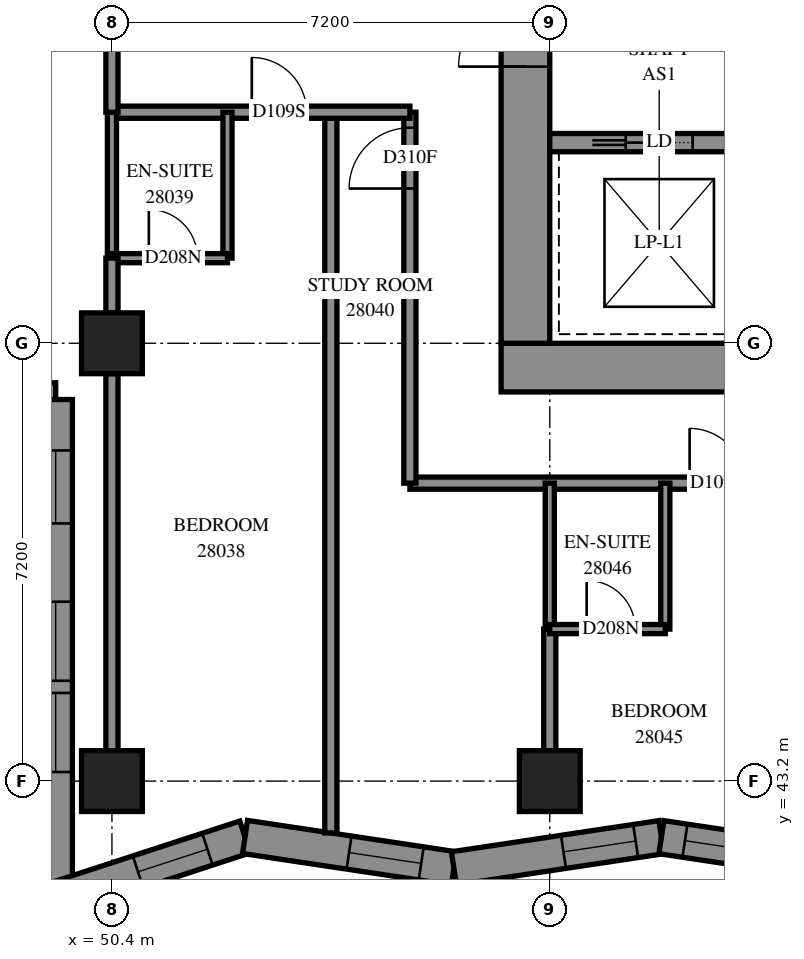
"""IFC4 building model, lengths in metres.
Left out: names, types, materials, properties, quantities, classifications, styles, units other than length and angle.
Written with IfcOpenShell. Run it as: python <this file> out.ifc"""

import sys

from ifc_helpers import new_model, si_unit, direction, frame, frame_2d, origin, origin_2d, place, context, subcontext, project, spatial, polyline, rectangle, outline, extrude, element, fill, save


model = new_model("IFC4")
c1 = context("Model", 3, precision=1e-05, world=origin(), true_north=direction((0.0, 1.0)))
c2 = subcontext(c1, "Body", "Model", "MODEL_VIEW")
j1 = project(units=[si_unit("LENGTHUNIT", "METRE"), si_unit("PLANEANGLEUNIT", "RADIAN")], contexts=[c1])
p1 = place(None, origin())
s1 = spatial("IfcSite", under=j1, at=p1, CompositionType="ELEMENT")
p2 = place(p1, origin())
s2 = spatial("IfcBuilding", under=s1, at=p2, CompositionType="ELEMENT")
p3 = place(p2, frame((0.0, 0.0, 105.0)))
s3 = spatial("IfcBuildingStorey", under=s2, at=p3, CompositionType="ELEMENT", Elevation=105.0)
for number, where, z_axis, x_axis in (
    (1, (50.4, 43.2, 0.0), (0.0, 0.0, 1.0), (1.0, 0.0, 0.0)),
    (2, (50.4, 50.4, 0.0), (0.0, 0.0, 1.0), (1.0, 0.0, 0.0)),
    (3, (57.6, 43.2, 0.0), (0.0, 0.0, 1.0), (1.0, 0.0, 0.0)),
):
    element("IfcColumn", number, at=place(p3, frame(where, z_axis=z_axis, x_axis=x_axis)), inside=s3, PredefinedType="COLUMN", context=c2, shape_type="SweptSolid", body=[
        extrude(rectangle(XDim=1.0, YDim=1.0, at=origin_2d()), origin(), (0.0, 0.0, 1.0), 3.1),
    ])
p4 = place(p3, frame((56.8, 50.0, -0.3), z_axis=(0.0, 0.0, 1.0), x_axis=(1.0, 0.0, 0.0)))
e4 = element("IfcWall", 4, at=p4, inside=s3, PredefinedType="SHEAR", context=c2, shape_type="SweptSolid", body=[
    extrude(rectangle(XDim=16.0, YDim=0.8, at=frame_2d((8.0, 0.0))), origin(), (0.0, 0.0, 1.0), 2.7),
])
p5 = place(p3, frame((57.2, 50.4, -0.3), z_axis=(0.0, 0.0, 1.0), x_axis=(0.0, 1.0, 0.0)))
e5 = element("IfcWall", 5, at=p5, inside=s3, PredefinedType="SHEAR", context=c2, shape_type="SweptSolid", body=[
    extrude(rectangle(XDim=14.4, YDim=0.8, at=frame_2d((7.2, 0.0))), origin(), (0.0, 0.0, 1.0), 2.7),
])
p6 = place(p5, frame((4.55, 0.0, 0.3)))
e6 = element("IfcOpeningElement", 6, at=p6, cuts=e5, PredefinedType="OPENING", context=c2, shape_type="SweptSolid", body=[
    extrude(rectangle(XDim=1.1, YDim=2.1, at=frame_2d((0.55, 1.05))), frame((0.0, 0.41, 0.0), z_axis=(0.0, -1.0, 0.0), x_axis=(1.0, 0.0, 0.0)), (0.0, 0.0, 1.0), 0.82),
])
p7 = place(p5, frame((11.35, 0.0, 0.3)))
e7 = element("IfcOpeningElement", 7, at=p7, cuts=e5, PredefinedType="OPENING", context=c2, shape_type="SweptSolid", body=[
    extrude(rectangle(XDim=1.1, YDim=2.1, at=frame_2d((0.55, 1.05))), frame((0.0, 0.41, 0.0), z_axis=(0.0, -1.0, 0.0), x_axis=(1.0, 0.0, 0.0)), (0.0, 0.0, 1.0), 0.82),
])
p8 = place(p3, frame((57.6, 53.7, 0.0), z_axis=(0.0, 0.0, 1.0), x_axis=(1.0, 0.0, 0.0)))
e8 = element("IfcWall", 8, at=p8, inside=s3, PredefinedType="SOLIDWALL", context=c2, shape_type="SweptSolid", body=[
    extrude(rectangle(XDim=14.4, YDim=0.3, at=frame_2d((7.2, 0.0))), origin(), (0.0, 0.0, 1.0), 3.1),
])
p9 = place(p8, frame((1.25, 0.0, 0.0)))
e9 = element("IfcOpeningElement", 9, at=p9, cuts=e8, PredefinedType="OPENING", context=c2, shape_type="SweptSolid", body=[
    extrude(rectangle(XDim=1.1, YDim=2.1, at=frame_2d((0.55, 1.05))), frame((0.0, 0.16, 0.0), z_axis=(0.0, -1.0, 0.0), x_axis=(1.0, 0.0, 0.0)), (0.0, 0.0, 1.0), 0.32),
])
p10 = place(p8, frame((4.85, 0.0, 0.0)))
e10 = element("IfcOpeningElement", 10, at=p10, cuts=e8, PredefinedType="OPENING", context=c2, shape_type="SweptSolid", body=[
    extrude(rectangle(XDim=1.1, YDim=2.1, at=frame_2d((0.55, 1.05))), frame((0.0, 0.16, 0.0), z_axis=(0.0, -1.0, 0.0), x_axis=(1.0, 0.0, 0.0)), (0.0, 0.0, 1.0), 0.32),
])
p11 = place(p8, frame((8.45, 0.0, 0.0)))
e11 = element("IfcOpeningElement", 11, at=p11, cuts=e8, PredefinedType="OPENING", context=c2, shape_type="SweptSolid", body=[
    extrude(rectangle(XDim=1.1, YDim=2.1, at=frame_2d((0.55, 1.05))), frame((0.0, 0.16, 0.0), z_axis=(0.0, -1.0, 0.0), x_axis=(1.0, 0.0, 0.0)), (0.0, 0.0, 1.0), 0.32),
])
p12 = place(p8, frame((12.05, 0.0, 0.0)))
e12 = element("IfcOpeningElement", 12, at=p12, cuts=e8, PredefinedType="OPENING", context=c2, shape_type="SweptSolid", body=[
    extrude(rectangle(XDim=1.1, YDim=2.1, at=frame_2d((0.55, 1.05))), frame((0.0, 0.16, 0.0), z_axis=(0.0, -1.0, 0.0), x_axis=(1.0, 0.0, 0.0)), (0.0, 0.0, 1.0), 0.32),
])
p13 = place(p3, frame((42.275, 49.475, 0.0), z_axis=(0.0, 0.0, 1.0), x_axis=(1.0, 0.0, 0.0)))
e13 = element("IfcWall", 13, at=p13, inside=s3, PredefinedType="SOLIDWALL", context=c2, shape_type="SweptSolid", body=[
    extrude(outline(polyline([(-0.275, -0.275), (6.925, -0.275), (7.475, 0.275), (0.275, 0.275), (-0.275, -0.275)])), origin(), (0.0, 0.0, 1.0), 3.1),
])
p14 = place(p13, frame((1.325, 0.0, 0.5)))
e14 = element("IfcOpeningElement", 14, at=p14, cuts=e13, PredefinedType="OPENING", context=c2, shape_type="SweptSolid", body=[
    extrude(rectangle(XDim=1.3, YDim=2.45, at=frame_2d((0.65, 1.225))), frame((0.0, 0.285, 0.0), z_axis=(0.0, -1.0, 0.0), x_axis=(1.0, 0.0, 0.0)), (0.0, 0.0, 1.0), 0.57),
])
p15 = place(p13, frame((2.825, 0.0, 0.5)))
e15 = element("IfcOpeningElement", 15, at=p15, cuts=e13, PredefinedType="OPENING", context=c2, shape_type="SweptSolid", body=[
    extrude(rectangle(XDim=1.3, YDim=2.45, at=frame_2d((0.65, 1.225))), frame((0.0, 0.285, 0.0), z_axis=(0.0, -1.0, 0.0), x_axis=(1.0, 0.0, 0.0)), (0.0, 0.0, 1.0), 0.57),
])
p16 = place(p13, frame((5.162, 0.0, 0.5)))
e16 = element("IfcOpeningElement", 16, at=p16, cuts=e13, PredefinedType="OPENING", context=c2, shape_type="SweptSolid", body=[
    extrude(rectangle(XDim=1.2, YDim=2.45, at=frame_2d((0.6, 1.225))), frame((0.0, 0.285, 0.0), z_axis=(0.0, -1.0, 0.0), x_axis=(1.0, 0.0, 0.0)), (0.0, 0.0, 1.0), 0.57),
])
p17 = place(p3, frame((49.475, 49.475, 0.0), z_axis=(0.0, 0.0, 1.0), x_axis=(0.0, -1.0, 0.0)))
e17 = element("IfcWall", 17, at=p17, inside=s3, PredefinedType="SOLIDWALL", context=c2, shape_type="SweptSolid", body=[
    extrude(outline(polyline([(0.275, -0.275), (8.587, -0.275), (7.829, 0.275), (-0.275, 0.275), (0.275, -0.275)])), origin(), (0.0, 0.0, 1.0), 3.1),
])
p18 = place(p17, frame((3.325, 0.0, 0.5)))
e18 = element("IfcOpeningElement", 18, at=p18, cuts=e17, PredefinedType="OPENING", context=c2, shape_type="SweptSolid", body=[
    extrude(rectangle(XDim=1.3, YDim=2.45, at=frame_2d((0.65, 1.225))), frame((0.0, 0.285, 0.0), z_axis=(0.0, -1.0, 0.0), x_axis=(1.0, 0.0, 0.0)), (0.0, 0.0, 1.0), 0.57),
])
p19 = place(p17, frame((4.825, 0.0, 0.5)))
e19 = element("IfcOpeningElement", 19, at=p19, cuts=e17, PredefinedType="OPENING", context=c2, shape_type="SweptSolid", body=[
    extrude(rectangle(XDim=1.3, YDim=2.45, at=frame_2d((0.65, 1.225))), frame((0.0, 0.285, 0.0), z_axis=(0.0, -1.0, 0.0), x_axis=(1.0, 0.0, 0.0)), (0.0, 0.0, 1.0), 0.57),
])
p20 = place(p17, frame((0.838, 0.0, 0.5)))
e20 = element("IfcOpeningElement", 20, at=p20, cuts=e17, PredefinedType="OPENING", context=c2, shape_type="SweptSolid", body=[
    extrude(rectangle(XDim=1.2, YDim=2.45, at=frame_2d((0.6, 1.225))), frame((0.0, 0.285, 0.0), z_axis=(0.0, -1.0, 0.0), x_axis=(1.0, 0.0, 0.0)), (0.0, 0.0, 1.0), 0.57),
])
p21 = place(p3, frame((49.475, 41.267, 0.0), z_axis=(0.0, 0.0, 1.0), x_axis=(0.9507812873, 0.3098627821, 0.0)))
e21 = element("IfcWall", 21, at=p21, inside=s3, PredefinedType="SOLIDWALL", context=c2, shape_type="SweptSolid", body=[
    extrude(outline(polyline([(-0.379, -0.275), (3.21, -0.275), (3.34, 0.275), (0.379, 0.275), (-0.379, -0.275)])), origin(), (0.0, 0.0, 1.0), 3.1),
])
p22 = place(p21, frame((1.424, 0.0, 0.5)))
e22 = element("IfcOpeningElement", 22, at=p22, cuts=e21, PredefinedType="OPENING", context=c2, shape_type="SweptSolid", body=[
    extrude(rectangle(XDim=1.2, YDim=2.45, at=frame_2d((0.6, 1.225))), frame((0.0, 0.285, 0.0), z_axis=(0.0, -1.0, 0.0), x_axis=(1.0, 0.0, 0.0)), (0.0, 0.0, 1.0), 0.57),
])
p23 = place(p3, frame((52.589, 42.282, 0.0), z_axis=(0.0, 0.0, 1.0), x_axis=(0.9889276939, -0.1483981679, 0.0)))
e23 = element("IfcWall", 23, at=p23, inside=s3, PredefinedType="SOLIDWALL", context=c2, shape_type="SweptSolid", body=[
    extrude(outline(polyline([(0.065, -0.275), (3.515, -0.275), (3.433, 0.275), (-0.065, 0.275), (0.065, -0.275)])), origin(), (0.0, 0.0, 1.0), 3.1),
])
p24 = place(p23, frame((1.73, 0.0, 0.5)))
e24 = element("IfcOpeningElement", 24, at=p24, cuts=e23, PredefinedType="OPENING", context=c2, shape_type="SweptSolid", body=[
    extrude(rectangle(XDim=1.2, YDim=2.45, at=frame_2d((0.6, 1.225))), frame((0.0, 0.285, 0.0), z_axis=(0.0, -1.0, 0.0), x_axis=(1.0, 0.0, 0.0)), (0.0, 0.0, 1.0), 0.57),
])
p25 = place(p3, frame((56.024, 41.766, 0.0), z_axis=(0.0, 0.0, 1.0), x_axis=(0.9889272091, 0.1484013984, 0.0)))
e25 = element("IfcWall", 25, at=p25, inside=s3, PredefinedType="SOLIDWALL", context=c2, shape_type="SweptSolid", body=[
    extrude(outline(polyline([(-0.041, -0.275), (3.409, -0.275), (3.491, 0.275), (0.041, 0.275), (-0.041, -0.275)])), origin(), (0.0, 0.0, 1.0), 3.1),
])
p26 = place(p25, frame((1.822, 0.0, 0.5)))
e26 = element("IfcOpeningElement", 26, at=p26, cuts=e25, PredefinedType="OPENING", context=c2, shape_type="SweptSolid", body=[
    extrude(rectangle(XDim=1.2, YDim=2.45, at=frame_2d((0.6, 1.225))), frame((0.0, 0.285, 0.0), z_axis=(0.0, -1.0, 0.0), x_axis=(1.0, 0.0, 0.0)), (0.0, 0.0, 1.0), 0.57),
])
p27 = place(p3, frame((59.436, 42.278, 0.0), z_axis=(0.0, 0.0, 1.0), x_axis=(0.9889272091, -0.1484013984, 0.0)))
e27 = element("IfcWall", 27, at=p27, inside=s3, PredefinedType="SOLIDWALL", context=c2, shape_type="SweptSolid", body=[
    extrude(outline(polyline([(0.041, -0.275), (3.491, -0.275), (3.409, 0.275), (-0.041, 0.275), (0.041, -0.275)])), origin(), (0.0, 0.0, 1.0), 3.1),
])
p28 = place(p27, frame((0.392, 0.0, 0.5)))
e28 = element("IfcOpeningElement", 28, at=p28, cuts=e27, PredefinedType="OPENING", context=c2, shape_type="SweptSolid", body=[
    extrude(rectangle(XDim=1.2, YDim=2.45, at=frame_2d((0.6, 1.225))), frame((0.0, 0.285, 0.0), z_axis=(0.0, -1.0, 0.0), x_axis=(1.0, 0.0, 0.0)), (0.0, 0.0, 1.0), 0.57),
])
p29 = place(p27, frame((1.896, 0.0, 0.5)))
e29 = element("IfcOpeningElement", 29, at=p29, cuts=e27, PredefinedType="OPENING", context=c2, shape_type="SweptSolid", body=[
    extrude(rectangle(XDim=1.2, YDim=2.45, at=frame_2d((0.6, 1.225))), frame((0.0, 0.285, 0.0), z_axis=(0.0, -1.0, 0.0), x_axis=(1.0, 0.0, 0.0)), (0.0, 0.0, 1.0), 0.57),
])
p30 = place(p3, frame((55.3, 48.1, 0.0), z_axis=(0.0, 0.0, 1.0), x_axis=(1.0, 0.0, 0.0)))
e30 = element("IfcWall", 30, at=p30, inside=s3, PredefinedType="PARTITIONING", context=c2, shape_type="SweptSolid", body=[
    extrude(rectangle(XDim=19.092, YDim=0.2, at=frame_2d((9.546, 0.0))), origin(), (0.0, 0.0, 1.0), 3.1),
])
p31 = place(p30, frame((4.6, 0.0, 0.0)))
e31 = element("IfcOpeningElement", 31, at=p31, cuts=e30, PredefinedType="OPENING", context=c2, shape_type="SweptSolid", body=[
    extrude(rectangle(XDim=0.9, YDim=2.1, at=frame_2d((0.45, 1.05))), frame((0.0, 0.11, 0.0), z_axis=(0.0, -1.0, 0.0), x_axis=(1.0, 0.0, 0.0)), (0.0, 0.0, 1.0), 0.22),
])
p32 = place(p30, frame((8.239, 0.0, 0.0)))
e32 = element("IfcOpeningElement", 32, at=p32, cuts=e30, PredefinedType="OPENING", context=c2, shape_type="SweptSolid", body=[
    extrude(rectangle(XDim=0.9, YDim=2.1, at=frame_2d((0.45, 1.05))), frame((0.0, 0.11, 0.0), z_axis=(0.0, -1.0, 0.0), x_axis=(1.0, 0.0, 0.0)), (0.0, 0.0, 1.0), 0.22),
])
p33 = place(p30, frame((13.5, 0.0, 0.0)))
e33 = element("IfcOpeningElement", 33, at=p33, cuts=e30, PredefinedType="OPENING", context=c2, shape_type="SweptSolid", body=[
    extrude(rectangle(XDim=0.9, YDim=2.1, at=frame_2d((0.45, 1.05))), frame((0.0, 0.11, 0.0), z_axis=(0.0, -1.0, 0.0), x_axis=(1.0, 0.0, 0.0)), (0.0, 0.0, 1.0), 0.22),
])
p34 = place(p3, frame((54.0, 42.348, 0.0), z_axis=(0.0, 0.0, 1.0), x_axis=(0.0, 1.0, 0.0)))
e34 = element("IfcWall", 34, at=p34, inside=s3, PredefinedType="PARTITIONING", context=c2, shape_type="SweptSolid", body=[
    extrude(rectangle(XDim=11.852, YDim=0.2, at=frame_2d((5.926, 0.0))), origin(), (0.0, 0.0, 1.0), 3.1),
])
p35 = place(p3, frame((50.4, 43.7, 0.0), z_axis=(0.0, 0.0, 1.0), x_axis=(0.0, 1.0, 0.0)))
e35 = element("IfcWall", 35, at=p35, inside=s3, PredefinedType="PARTITIONING", context=c2, shape_type="SweptSolid", body=[
    extrude(rectangle(XDim=6.2, YDim=0.2, at=frame_2d((3.1, 0.0))), origin(), (0.0, 0.0, 1.0), 2.6),
])
p36 = place(p3, frame((55.3, 48.1, 0.0), z_axis=(0.0, 0.0, 1.0), x_axis=(0.0, 1.0, 0.0)))
e36 = element("IfcWall", 36, at=p36, inside=s3, PredefinedType="PARTITIONING", context=c2, shape_type="SweptSolid", body=[
    extrude(rectangle(XDim=6.1, YDim=0.2, at=frame_2d((3.05, 0.0))), origin(), (0.0, 0.0, 1.0), 3.1),
])
p37 = place(p36, frame((4.845, 0.0, 0.0)))
e37 = element("IfcOpeningElement", 37, at=p37, cuts=e36, PredefinedType="OPENING", context=c2, shape_type="SweptSolid", body=[
    extrude(rectangle(XDim=1.0, YDim=2.1, at=frame_2d((0.5, 1.05))), frame((0.0, 0.11, 0.0), z_axis=(0.0, -1.0, 0.0), x_axis=(1.0, 0.0, 0.0)), (0.0, 0.0, 1.0), 0.22),
])
p38 = place(p3, frame((50.4, 54.2, 0.0), z_axis=(0.0, 0.0, 1.0), x_axis=(1.0, 0.0, 0.0)))
e38 = element("IfcWall", 38, at=p38, inside=s3, PredefinedType="PARTITIONING", context=c2, shape_type="SweptSolid", body=[
    extrude(rectangle(XDim=4.9, YDim=0.2, at=frame_2d((2.45, 0.0))), origin(), (0.0, 0.0, 1.0), 3.1),
])
p39 = place(p38, frame((2.3, 0.0, 0.0)))
e39 = element("IfcOpeningElement", 39, at=p39, cuts=e38, PredefinedType="OPENING", context=c2, shape_type="SweptSolid", body=[
    extrude(rectangle(XDim=0.9, YDim=2.1, at=frame_2d((0.45, 1.05))), frame((0.0, 0.11, 0.0), z_axis=(0.0, -1.0, 0.0), x_axis=(1.0, 0.0, 0.0)), (0.0, 0.0, 1.0), 0.22),
])
for number, where, z_axis, x_axis in (
    (40, (52.3, 51.8, 0.0), (0.0, 0.0, 1.0), (0.0, 1.0, 0.0)),
    (41, (50.4, 51.8, 0.0), (0.0, 0.0, 1.0), (0.0, 1.0, 0.0)),
    (42, (59.5, 45.7, 0.0), (0.0, 0.0, 1.0), (0.0, 1.0, 0.0)),
    (43, (57.6, 45.7, 0.0), (0.0, 0.0, 1.0), (0.0, 1.0, 0.0)),
):
    element("IfcWall", number, at=place(p3, frame(where, z_axis=z_axis, x_axis=x_axis)), inside=s3, PredefinedType="PARTITIONING", context=c2, shape_type="SweptSolid", body=[
        extrude(rectangle(XDim=2.4, YDim=0.15, at=frame_2d((1.2, 0.0))), origin(), (0.0, 0.0, 1.0), 3.1),
    ])
for number, where, z_axis, x_axis in (
    (44, (50.4, 54.2, 0.0), (0.0, 0.0, 1.0), (0.0, 1.0, 0.0)),
    (45, (57.6, 43.7, 0.0), (0.0, 0.0, 1.0), (0.0, 1.0, 0.0)),
):
    element("IfcWall", number, at=place(p3, frame(where, z_axis=z_axis, x_axis=x_axis)), inside=s3, PredefinedType="PARTITIONING", context=c2, shape_type="SweptSolid", body=[
        extrude(rectangle(XDim=2.0, YDim=0.2, at=frame_2d((1.0, 0.0))), origin(), (0.0, 0.0, 1.0), 3.1),
    ])
p40 = place(p3, frame((50.4, 51.8, 0.0), z_axis=(0.0, 0.0, 1.0), x_axis=(1.0, 0.0, 0.0)))
e46 = element("IfcWall", 46, at=p40, inside=s3, PredefinedType="PARTITIONING", context=c2, shape_type="SweptSolid", body=[
    extrude(rectangle(XDim=1.9, YDim=0.15, at=frame_2d((0.95, 0.0))), origin(), (0.0, 0.0, 1.0), 3.1),
])
p41 = place(p40, frame((0.607, 0.0, 0.0)))
e47 = element("IfcOpeningElement", 47, at=p41, cuts=e46, PredefinedType="OPENING", context=c2, shape_type="SweptSolid", body=[
    extrude(rectangle(XDim=0.8, YDim=2.1, at=frame_2d((0.4, 1.05))), frame((0.0, 0.085, 0.0), z_axis=(0.0, -1.0, 0.0), x_axis=(1.0, 0.0, 0.0)), (0.0, 0.0, 1.0), 0.17),
])
p42 = place(p3, frame((57.6, 45.7, 0.0), z_axis=(0.0, 0.0, 1.0), x_axis=(1.0, 0.0, 0.0)))
e48 = element("IfcWall", 48, at=p42, inside=s3, PredefinedType="PARTITIONING", context=c2, shape_type="SweptSolid", body=[
    extrude(rectangle(XDim=1.9, YDim=0.15, at=frame_2d((0.95, 0.0))), origin(), (0.0, 0.0, 1.0), 3.1),
])
p43 = place(p42, frame((0.607, 0.0, 0.0)))
e49 = element("IfcOpeningElement", 49, at=p43, cuts=e48, PredefinedType="OPENING", context=c2, shape_type="SweptSolid", body=[
    extrude(rectangle(XDim=0.8, YDim=2.1, at=frame_2d((0.4, 1.05))), frame((0.0, 0.085, 0.0), z_axis=(0.0, -1.0, 0.0), x_axis=(1.0, 0.0, 0.0)), (0.0, 0.0, 1.0), 0.17),
])
p44 = place(p3, frame((50.4, 50.9, 0.0), z_axis=(0.0, 0.0, 1.0), x_axis=(0.0, 1.0, 0.0)))
e50 = element("IfcWall", 50, at=p44, inside=s3, PredefinedType="PARTITIONING", context=c2, shape_type="SweptSolid", body=[
    extrude(rectangle(XDim=0.9, YDim=0.2, at=frame_2d((0.45, 0.0))), origin(), (0.0, 0.0, 1.0), 3.1),
])
p45 = place(p18, origin())
e51 = element("IfcWindow", 51, at=p45, inside=s3, PartitioningType="SINGLE_PANEL", PredefinedType="WINDOW", context=c2, shape_type="SweptSolid", body=[
    extrude(rectangle(XDim=1.3, YDim=2.45, at=frame_2d((0.65, 1.225))), frame((0.0, 0.155, 0.0), z_axis=(0.0, -1.0, 0.0), x_axis=(1.0, 0.0, 0.0)), (0.0, 0.0, 1.0), 0.06),
])
fill(e18, e51)
p46 = place(p19, origin())
e52 = element("IfcWindow", 52, at=p46, inside=s3, PartitioningType="SINGLE_PANEL", PredefinedType="WINDOW", context=c2, shape_type="SweptSolid", body=[
    extrude(rectangle(XDim=1.3, YDim=2.45, at=frame_2d((0.65, 1.225))), frame((0.0, 0.155, 0.0), z_axis=(0.0, -1.0, 0.0), x_axis=(1.0, 0.0, 0.0)), (0.0, 0.0, 1.0), 0.06),
])
fill(e19, e52)
p47 = place(p20, origin())
e53 = element("IfcWindow", 53, at=p47, inside=s3, PartitioningType="SINGLE_PANEL", PredefinedType="WINDOW", context=c2, shape_type="SweptSolid", body=[
    extrude(rectangle(XDim=1.2, YDim=2.45, at=frame_2d((0.6, 1.225))), frame((0.0, 0.155, 0.0), z_axis=(0.0, -1.0, 0.0), x_axis=(1.0, 0.0, 0.0)), (0.0, 0.0, 1.0), 0.06),
])
fill(e20, e53)
p48 = place(p22, origin())
e54 = element("IfcWindow", 54, at=p48, inside=s3, PartitioningType="SINGLE_PANEL", PredefinedType="WINDOW", context=c2, shape_type="SweptSolid", body=[
    extrude(rectangle(XDim=1.2, YDim=2.45, at=frame_2d((0.6, 1.225))), frame((0.0, 0.155, 0.0), z_axis=(0.0, -1.0, 0.0), x_axis=(1.0, 0.0, 0.0)), (0.0, 0.0, 1.0), 0.06),
])
fill(e22, e54)
p49 = place(p24, origin())
e55 = element("IfcWindow", 55, at=p49, inside=s3, PartitioningType="SINGLE_PANEL", PredefinedType="WINDOW", context=c2, shape_type="SweptSolid", body=[
    extrude(rectangle(XDim=1.2, YDim=2.45, at=frame_2d((0.6, 1.225))), frame((0.0, 0.155, 0.0), z_axis=(0.0, -1.0, 0.0), x_axis=(1.0, 0.0, 0.0)), (0.0, 0.0, 1.0), 0.06),
])
fill(e24, e55)
p50 = place(p26, origin())
e56 = element("IfcWindow", 56, at=p50, inside=s3, PartitioningType="SINGLE_PANEL", PredefinedType="WINDOW", context=c2, shape_type="SweptSolid", body=[
    extrude(rectangle(XDim=1.2, YDim=2.45, at=frame_2d((0.6, 1.225))), frame((0.0, 0.155, 0.0), z_axis=(0.0, -1.0, 0.0), x_axis=(1.0, 0.0, 0.0)), (0.0, 0.0, 1.0), 0.06),
])
fill(e26, e56)
p51 = place(p28, origin())
e57 = element("IfcWindow", 57, at=p51, inside=s3, PartitioningType="SINGLE_PANEL", PredefinedType="WINDOW", context=c2, shape_type="SweptSolid", body=[
    extrude(rectangle(XDim=1.2, YDim=2.45, at=frame_2d((0.6, 1.225))), frame((0.0, 0.155, 0.0), z_axis=(0.0, -1.0, 0.0), x_axis=(1.0, 0.0, 0.0)), (0.0, 0.0, 1.0), 0.06),
])
fill(e28, e57)
p52 = place(p6, origin())
e58 = element("IfcDoor", 58, at=p52, inside=s3, OperationType="DOUBLE_DOOR_SINGLE_SWING", PredefinedType="DOOR", context=c2, shape_type="SweptSolid", body=[
    extrude(rectangle(XDim=1.1, YDim=2.1, at=frame_2d((0.55, 1.05))), frame((0.0, 0.025, 0.0), z_axis=(0.0, -1.0, 0.0), x_axis=(1.0, 0.0, 0.0)), (0.0, 0.0, 1.0), 0.05),
])
fill(e6, e58)
p53 = place(p9, origin())
e59 = element("IfcDoor", 59, at=p53, inside=s3, OperationType="SLIDING_TO_LEFT", PredefinedType="DOOR", context=c2, shape_type="SweptSolid", body=[
    extrude(rectangle(XDim=1.1, YDim=2.1, at=frame_2d((0.55, 1.05))), frame((0.0, 0.025, 0.0), z_axis=(0.0, -1.0, 0.0), x_axis=(1.0, 0.0, 0.0)), (0.0, 0.0, 1.0), 0.05),
])
fill(e9, e59)
p54 = place(p39, origin())
e60 = element("IfcDoor", 60, at=p54, inside=s3, OperationType="SINGLE_SWING_LEFT", PredefinedType="DOOR", context=c2, shape_type="SweptSolid", body=[
    extrude(rectangle(XDim=0.9, YDim=2.1, at=frame_2d((0.45, 1.05))), frame((0.0, 0.025, 0.0), z_axis=(0.0, -1.0, 0.0), x_axis=(1.0, 0.0, 0.0)), (0.0, 0.0, 1.0), 0.05),
])
fill(e39, e60)
p55 = place(p41, origin())
e61 = element("IfcDoor", 61, at=p55, inside=s3, OperationType="SINGLE_SWING_RIGHT", PredefinedType="DOOR", context=c2, shape_type="SweptSolid", body=[
    extrude(rectangle(XDim=0.8, YDim=2.1, at=frame_2d((0.4, 1.05))), frame((0.0, 0.025, 0.0), z_axis=(0.0, -1.0, 0.0), x_axis=(1.0, 0.0, 0.0)), (0.0, 0.0, 1.0), 0.05),
])
fill(e47, e61)
p56 = place(p37, origin())
e62 = element("IfcDoor", 62, at=p56, inside=s3, OperationType="SINGLE_SWING_RIGHT", PredefinedType="DOOR", context=c2, shape_type="SweptSolid", body=[
    extrude(rectangle(XDim=1.0, YDim=2.1, at=frame_2d((0.5, 1.05))), frame((0.0, 0.025, 0.0), z_axis=(0.0, -1.0, 0.0), x_axis=(1.0, 0.0, 0.0)), (0.0, 0.0, 1.0), 0.05),
])
fill(e37, e62)
p57 = place(p31, origin())
e63 = element("IfcDoor", 63, at=p57, inside=s3, OperationType="SINGLE_SWING_LEFT", PredefinedType="DOOR", context=c2, shape_type="SweptSolid", body=[
    extrude(rectangle(XDim=0.9, YDim=2.1, at=frame_2d((0.45, 1.05))), frame((0.0, 0.025, 0.0), z_axis=(0.0, -1.0, 0.0), x_axis=(1.0, 0.0, 0.0)), (0.0, 0.0, 1.0), 0.05),
])
fill(e31, e63)
p58 = place(p43, origin())
e64 = element("IfcDoor", 64, at=p58, inside=s3, OperationType="SINGLE_SWING_RIGHT", PredefinedType="DOOR", context=c2, shape_type="SweptSolid", body=[
    extrude(rectangle(XDim=0.8, YDim=2.1, at=frame_2d((0.4, 1.05))), frame((0.0, 0.025, 0.0), z_axis=(0.0, -1.0, 0.0), x_axis=(1.0, 0.0, 0.0)), (0.0, 0.0, 1.0), 0.05),
])
fill(e49, e64)
save(model, sys.argv[1])
